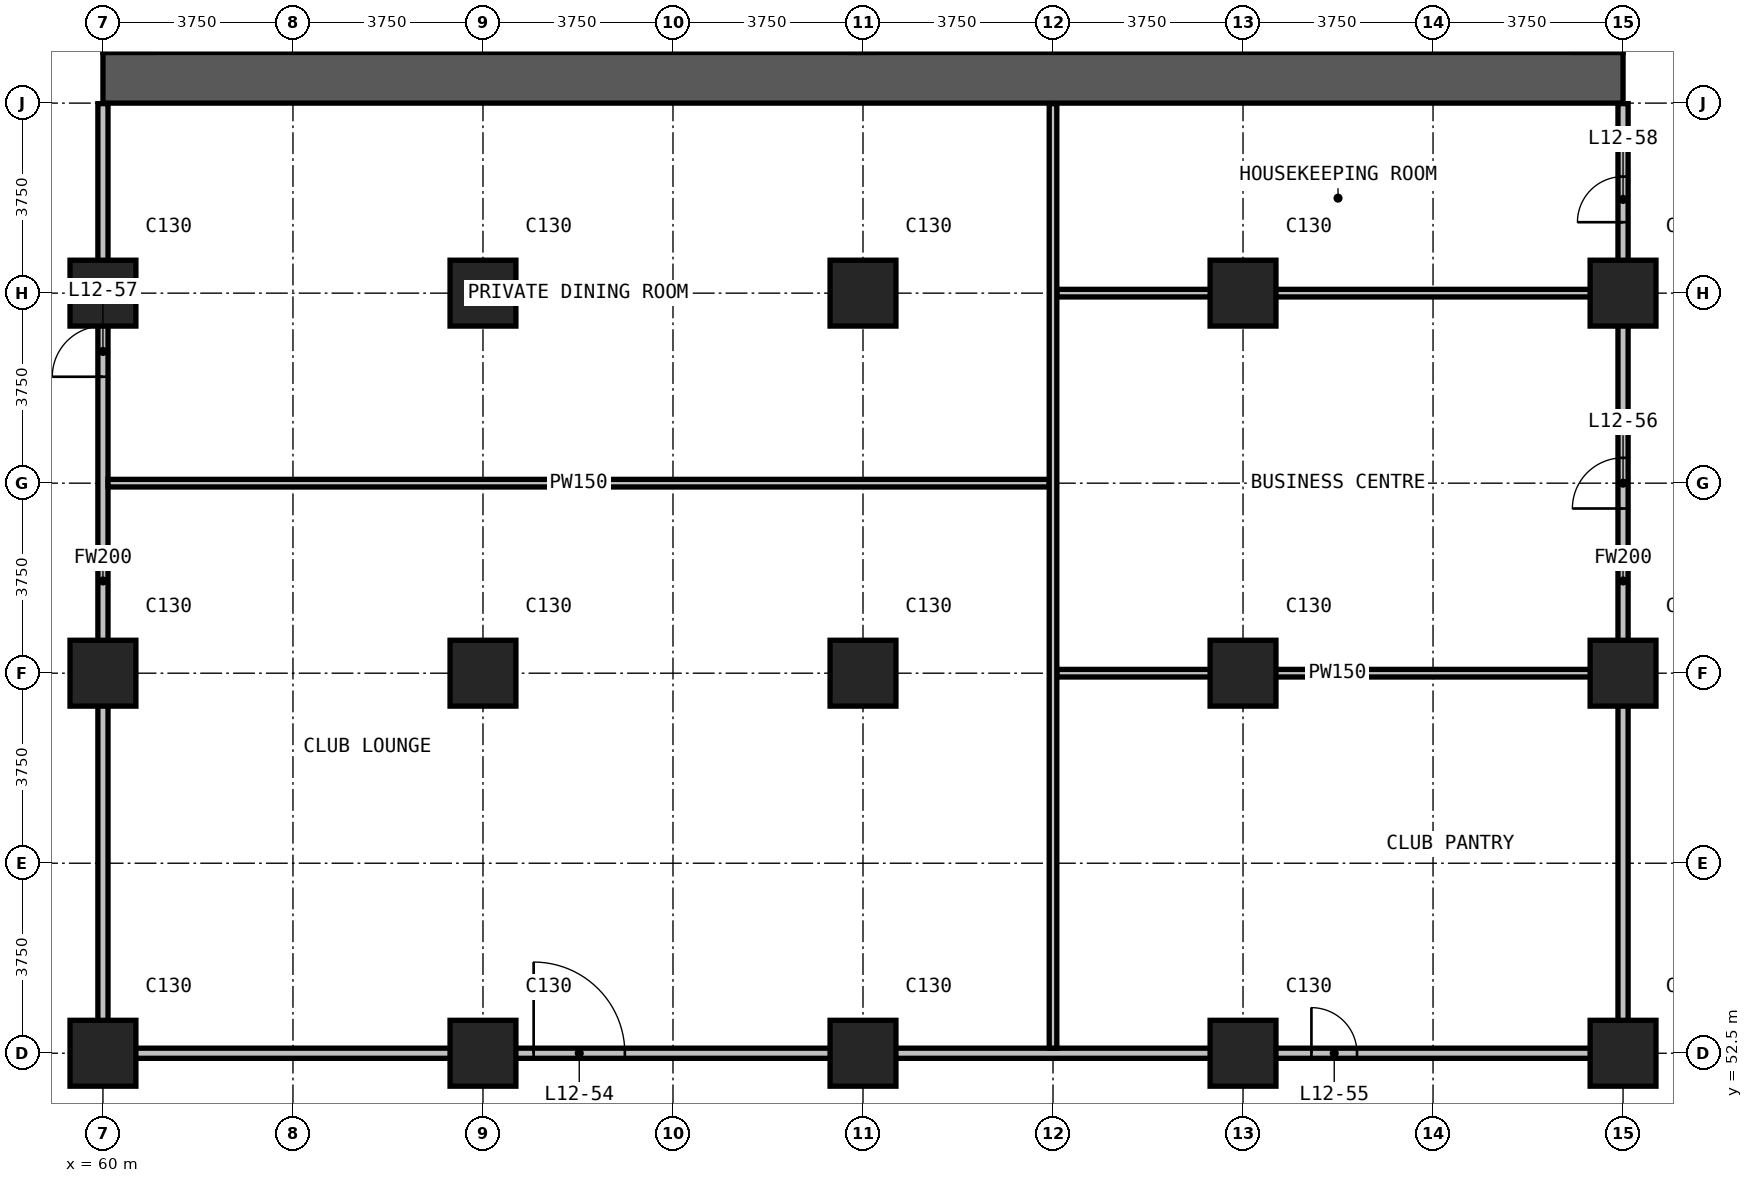
"""IFC4 building model, lengths in metres.
Left out: names, types, materials, properties, quantities, classifications, styles, units other than length and angle.
Written with IfcOpenShell. Run it as: python <this file> out.ifc"""

import sys

from ifc_helpers import new_model, si_unit, direction, frame, frame_2d, origin, origin_2d, place, context, subcontext, project, spatial, rectangle, extrude, element, fill, save


model = new_model("IFC4")
c1 = context("Model", 3, precision=1e-05, world=origin(), true_north=direction((0.0, 1.0)))
c2 = subcontext(c1, "Body", "Model", "MODEL_VIEW")
j1 = project(units=[si_unit("LENGTHUNIT", "METRE"), si_unit("PLANEANGLEUNIT", "RADIAN")], contexts=[c1])
p1 = place(None, origin())
s1 = spatial("IfcSite", under=j1, at=p1, CompositionType="ELEMENT")
p2 = place(p1, origin())
s2 = spatial("IfcBuilding", under=s1, at=p2, CompositionType="ELEMENT")
p3 = place(p2, frame((0.0, 0.0, 59.3)))
s3 = spatial("IfcBuildingStorey", under=s2, at=p3, CompositionType="ELEMENT", Elevation=59.3)
for number, where, z_axis, x_axis in (
    (1, (60.0, 52.5, 0.0), (0.0, 0.0, 1.0), (1.0, 0.0, 0.0)),
    (2, (60.0, 60.0, 0.0), (0.0, 0.0, 1.0), (1.0, 0.0, 0.0)),
    (3, (60.0, 67.5, 0.0), (0.0, 0.0, 1.0), (1.0, 0.0, 0.0)),
    (4, (67.5, 52.5, 0.0), (0.0, 0.0, 1.0), (1.0, 0.0, 0.0)),
    (5, (67.5, 60.0, 0.0), (0.0, 0.0, 1.0), (1.0, 0.0, 0.0)),
    (6, (67.5, 67.5, 0.0), (0.0, 0.0, 1.0), (1.0, 0.0, 0.0)),
    (7, (75.0, 52.5, 0.0), (0.0, 0.0, 1.0), (1.0, 0.0, 0.0)),
    (8, (75.0, 60.0, 0.0), (0.0, 0.0, 1.0), (1.0, 0.0, 0.0)),
    (9, (75.0, 67.5, 0.0), (0.0, 0.0, 1.0), (1.0, 0.0, 0.0)),
    (10, (82.5, 52.5, 0.0), (0.0, 0.0, 1.0), (1.0, 0.0, 0.0)),
    (11, (82.5, 60.0, 0.0), (0.0, 0.0, 1.0), (1.0, 0.0, 0.0)),
    (12, (82.5, 67.5, 0.0), (0.0, 0.0, 1.0), (1.0, 0.0, 0.0)),
    (13, (90.0, 52.5, 0.0), (0.0, 0.0, 1.0), (1.0, 0.0, 0.0)),
    (14, (90.0, 60.0, 0.0), (0.0, 0.0, 1.0), (1.0, 0.0, 0.0)),
    (15, (90.0, 67.5, 0.0), (0.0, 0.0, 1.0), (1.0, 0.0, 0.0)),
):
    element("IfcColumn", number, at=place(p3, frame(where, z_axis=z_axis, x_axis=x_axis)), inside=s3, PredefinedType="COLUMN", context=c2, shape_type="SweptSolid", body=[
        extrude(rectangle(XDim=1.3, YDim=1.3, at=origin_2d()), origin(), (0.0, 0.0, 1.0), 3.3),
    ])
p4 = place(p3, frame((60.0, 71.75, 0.0), z_axis=(0.0, 0.0, 1.0), x_axis=(1.0, 0.0, 0.0)))
e16 = element("IfcWall", 16, at=p4, inside=s3, PredefinedType="SHEAR", context=c2, shape_type="SweptSolid", body=[
    extrude(rectangle(XDim=30.0, YDim=1.0, at=frame_2d((15.0, 0.0))), origin(), (0.0, 0.0, 1.0), 3.3),
])
p5 = place(p3, frame((60.1, 52.5, 0.0), z_axis=(0.0, 0.0, 1.0), x_axis=(1.0, 0.0, 0.0)))
e17 = element("IfcWall", 17, at=p5, inside=s3, PredefinedType="PARTITIONING", context=c2, shape_type="SweptSolid", body=[
    extrude(rectangle(XDim=29.8, YDim=0.2, at=frame_2d((14.9, 0.0))), origin(), (0.0, 0.0, 1.0), 3.0),
])
p6 = place(p5, frame((8.4, 0.0, 0.0)))
e18 = element("IfcOpeningElement", 18, at=p6, cuts=e17, PredefinedType="OPENING", context=c2, shape_type="SweptSolid", body=[
    extrude(rectangle(XDim=1.8, YDim=2.2, at=frame_2d((0.9, 1.1))), frame((0.0, 0.11, 0.0), z_axis=(0.0, -1.0, 0.0), x_axis=(1.0, 0.0, 0.0)), (0.0, 0.0, 1.0), 0.22),
])
p7 = place(p5, frame((23.75, 0.0, 0.0)))
e19 = element("IfcOpeningElement", 19, at=p7, cuts=e17, PredefinedType="OPENING", context=c2, shape_type="SweptSolid", body=[
    extrude(rectangle(XDim=0.9, YDim=2.2, at=frame_2d((0.45, 1.1))), frame((0.0, 0.11, 0.0), z_axis=(0.0, -1.0, 0.0), x_axis=(1.0, 0.0, 0.0)), (0.0, 0.0, 1.0), 0.22),
])
p8 = place(p3, frame((60.0, 52.4, 0.0), z_axis=(0.0, 0.0, 1.0), x_axis=(0.0, 1.0, 0.0)))
e20 = element("IfcWall", 20, at=p8, inside=s3, PredefinedType="PARTITIONING", context=c2, shape_type="SweptSolid", body=[
    extrude(rectangle(XDim=18.84, YDim=0.2, at=frame_2d((9.42, 0.0))), origin(), (0.0, 0.0, 1.0), 3.0),
])
p9 = place(p8, frame((13.45, 0.0, 0.0)))
e21 = element("IfcOpeningElement", 21, at=p9, cuts=e20, PredefinedType="OPENING", context=c2, shape_type="SweptSolid", body=[
    extrude(rectangle(XDim=1.0, YDim=2.2, at=frame_2d((0.5, 1.1))), frame((0.0, 0.11, 0.0), z_axis=(0.0, -1.0, 0.0), x_axis=(1.0, 0.0, 0.0)), (0.0, 0.0, 1.0), 0.22),
])
p10 = place(p3, frame((90.0, 52.4, 0.0), z_axis=(0.0, 0.0, 1.0), x_axis=(0.0, 1.0, 0.0)))
e22 = element("IfcWall", 22, at=p10, inside=s3, PredefinedType="PARTITIONING", context=c2, shape_type="SweptSolid", body=[
    extrude(rectangle(XDim=18.84, YDim=0.2, at=frame_2d((9.42, 0.0))), origin(), (0.0, 0.0, 1.0), 3.0),
])
p11 = place(p10, frame((10.85, 0.0, 0.0)))
e23 = element("IfcOpeningElement", 23, at=p11, cuts=e22, PredefinedType="OPENING", context=c2, shape_type="SweptSolid", body=[
    extrude(rectangle(XDim=1.0, YDim=2.2, at=frame_2d((0.5, 1.1))), frame((0.0, 0.11, 0.0), z_axis=(0.0, -1.0, 0.0), x_axis=(1.0, 0.0, 0.0)), (0.0, 0.0, 1.0), 0.22),
])
p12 = place(p10, frame((16.5, 0.0, 0.0)))
e24 = element("IfcOpeningElement", 24, at=p12, cuts=e22, PredefinedType="OPENING", context=c2, shape_type="SweptSolid", body=[
    extrude(rectangle(XDim=0.9, YDim=2.2, at=frame_2d((0.45, 1.1))), frame((0.0, 0.11, 0.0), z_axis=(0.0, -1.0, 0.0), x_axis=(1.0, 0.0, 0.0)), (0.0, 0.0, 1.0), 0.22),
])
p13 = place(p3, frame((78.825, 60.0, 0.0), z_axis=(0.0, 0.0, 1.0), x_axis=(1.0, 0.0, 0.0)))
e25 = element("IfcWall", 25, at=p13, inside=s3, PredefinedType="PARTITIONING", context=c2, shape_type="SweptSolid", body=[
    extrude(rectangle(XDim=11.075, YDim=0.15, at=frame_2d((5.538, 0.0))), origin(), (0.0, 0.0, 1.0), 3.0),
])
p14 = place(p3, frame((60.1, 63.75, 0.0), z_axis=(0.0, 0.0, 1.0), x_axis=(1.0, 0.0, 0.0)))
e26 = element("IfcWall", 26, at=p14, inside=s3, PredefinedType="PARTITIONING", context=c2, shape_type="SweptSolid", body=[
    extrude(rectangle(XDim=18.575, YDim=0.15, at=frame_2d((9.288, 0.0))), origin(), (0.0, 0.0, 1.0), 3.0),
])
p15 = place(p3, frame((78.825, 67.5, 0.0), z_axis=(0.0, 0.0, 1.0), x_axis=(1.0, 0.0, 0.0)))
e27 = element("IfcWall", 27, at=p15, inside=s3, PredefinedType="PARTITIONING", context=c2, shape_type="SweptSolid", body=[
    extrude(rectangle(XDim=11.075, YDim=0.15, at=frame_2d((5.538, 0.0))), origin(), (0.0, 0.0, 1.0), 3.0),
])
p16 = place(p3, frame((78.75, 52.6, 0.0), z_axis=(0.0, 0.0, 1.0), x_axis=(0.0, 1.0, 0.0)))
e28 = element("IfcWall", 28, at=p16, inside=s3, PredefinedType="PARTITIONING", context=c2, shape_type="SweptSolid", body=[
    extrude(rectangle(XDim=18.64, YDim=0.15, at=frame_2d((9.32, 0.0))), origin(), (0.0, 0.0, 1.0), 3.0),
])
p17 = place(p6, origin())
e29 = element("IfcDoor", 29, at=p17, inside=s3, OperationType="DOUBLE_DOOR_SINGLE_SWING", PredefinedType="DOOR", context=c2, shape_type="SweptSolid", body=[
    extrude(rectangle(XDim=1.8, YDim=2.2, at=frame_2d((0.9, 1.1))), frame((0.0, 0.025, 0.0), z_axis=(0.0, -1.0, 0.0), x_axis=(1.0, 0.0, 0.0)), (0.0, 0.0, 1.0), 0.05),
])
fill(e18, e29)
p18 = place(p7, origin())
e30 = element("IfcDoor", 30, at=p18, inside=s3, OperationType="SINGLE_SWING_RIGHT", PredefinedType="DOOR", context=c2, shape_type="SweptSolid", body=[
    extrude(rectangle(XDim=0.9, YDim=2.2, at=frame_2d((0.45, 1.1))), frame((0.0, 0.025, 0.0), z_axis=(0.0, -1.0, 0.0), x_axis=(1.0, 0.0, 0.0)), (0.0, 0.0, 1.0), 0.05),
])
fill(e19, e30)
p19 = place(p11, origin())
e31 = element("IfcDoor", 31, at=p19, inside=s3, OperationType="SINGLE_SWING_RIGHT", PredefinedType="DOOR", context=c2, shape_type="SweptSolid", body=[
    extrude(rectangle(XDim=1.0, YDim=2.2, at=frame_2d((0.5, 1.1))), frame((0.0, 0.025, 0.0), z_axis=(0.0, -1.0, 0.0), x_axis=(1.0, 0.0, 0.0)), (0.0, 0.0, 1.0), 0.05),
])
fill(e23, e31)
p20 = place(p9, origin())
e32 = element("IfcDoor", 32, at=p20, inside=s3, OperationType="SINGLE_SWING_LEFT", PredefinedType="DOOR", context=c2, shape_type="SweptSolid", body=[
    extrude(rectangle(XDim=1.0, YDim=2.2, at=frame_2d((0.5, 1.1))), frame((0.0, 0.025, 0.0), z_axis=(0.0, -1.0, 0.0), x_axis=(1.0, 0.0, 0.0)), (0.0, 0.0, 1.0), 0.05),
])
fill(e21, e32)
p21 = place(p12, origin())
e33 = element("IfcDoor", 33, at=p21, inside=s3, OperationType="SINGLE_SWING_RIGHT", PredefinedType="DOOR", context=c2, shape_type="SweptSolid", body=[
    extrude(rectangle(XDim=0.9, YDim=2.2, at=frame_2d((0.45, 1.1))), frame((0.0, 0.025, 0.0), z_axis=(0.0, -1.0, 0.0), x_axis=(1.0, 0.0, 0.0)), (0.0, 0.0, 1.0), 0.05),
])
fill(e24, e33)
save(model, sys.argv[1])
